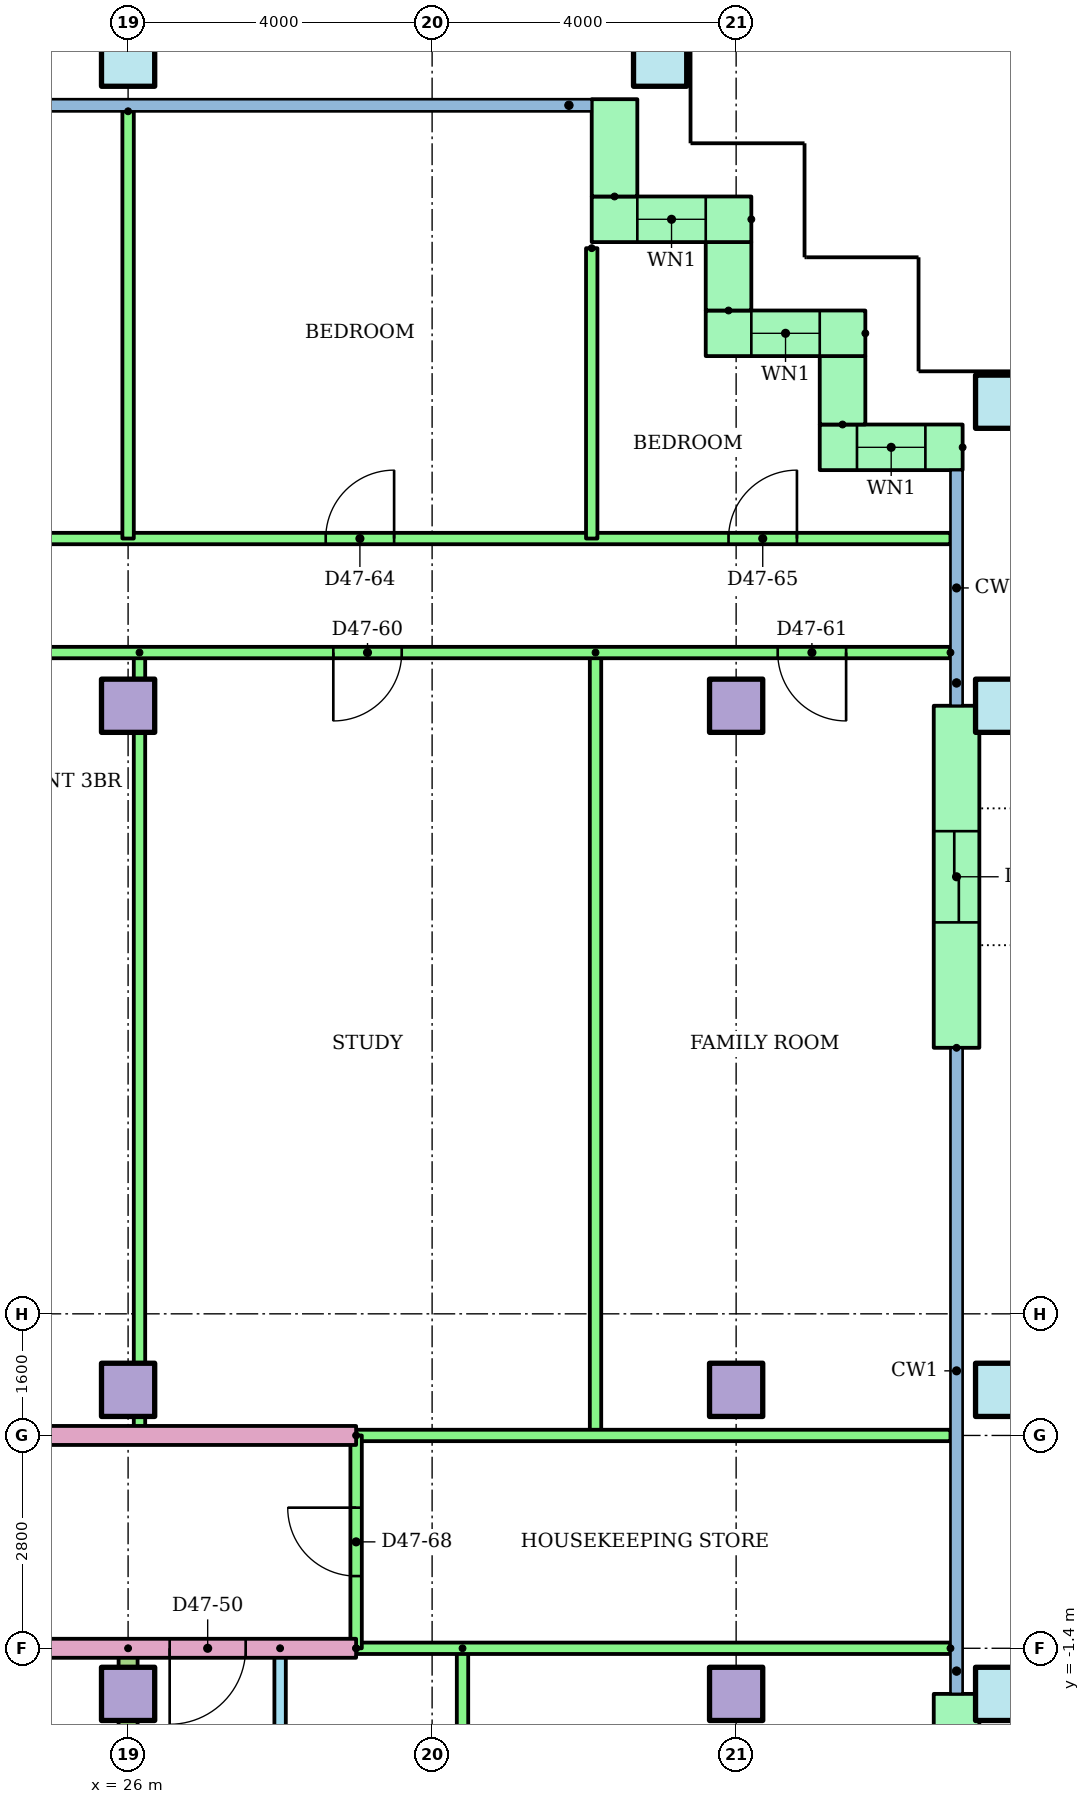
"""IFC4 building model, lengths in metres.
Left out: names, types, materials, properties, quantities, classifications, styles, units other than length and angle.
Written with IfcOpenShell. Run it as: python <this file> out.ifc"""

import sys

from ifc_helpers import new_model, si_unit, direction, frame, frame_2d, origin, origin_2d, place, context, subcontext, project, spatial, rectangle, hollow_rectangle, extrude, element, fill, save


model = new_model("IFC4")
c1 = context("Model", 3, precision=1e-05, world=origin(), true_north=direction((0.0, 1.0)))
c2 = subcontext(c1, "Body", "Model", "MODEL_VIEW")
j1 = project(units=[si_unit("LENGTHUNIT", "METRE"), si_unit("PLANEANGLEUNIT", "RADIAN")], contexts=[c1])
p1 = place(None, origin())
s1 = spatial("IfcSite", under=j1, at=p1, CompositionType="ELEMENT")
p2 = place(p1, origin())
s2 = spatial("IfcBuilding", under=s1, at=p2, CompositionType="ELEMENT")
p3 = place(p2, frame((0.0, 0.0, 181.3)))
s3 = spatial("IfcBuildingStorey", under=s2, at=p3, CompositionType="ELEMENT", Elevation=181.3)
for number, where in (
    (1, (26.0, -2.0, 0.0)),
    (2, (34.0, -2.0, 0.0)),
):
    element("IfcColumn", number, at=place(p3, frame(where)), inside=s3, PredefinedType="COLUMN", context=c2, shape_type="SweptSolid", body=[
        extrude(rectangle(XDim=0.7, YDim=0.7, at=origin_2d()), origin(), (0.0, 0.0, 1.0), 3.2),
    ])
p4 = place(p3, frame((37.5, -2.0, 0.0)))
e3 = element("IfcColumn", 3, at=p4, inside=s3, PredefinedType="COLUMN", context=c2, shape_type="SweptSolid", body=[
    extrude(hollow_rectangle(XDim=0.7, YDim=0.7, WallThickness=0.036, at=origin_2d()), origin(), (0.0, 0.0, 1.0), 3.2),
])
for number, where in (
    (4, (26.0, 2.0, 0.0)),
    (5, (34.0, 2.0, 0.0)),
):
    element("IfcColumn", number, at=place(p3, frame(where)), inside=s3, PredefinedType="COLUMN", context=c2, shape_type="SweptSolid", body=[
        extrude(rectangle(XDim=0.7, YDim=0.7, at=origin_2d()), origin(), (0.0, 0.0, 1.0), 3.2),
    ])
p5 = place(p3, frame((37.5, 2.0, 0.0)))
e6 = element("IfcColumn", 6, at=p5, inside=s3, PredefinedType="COLUMN", context=c2, shape_type="SweptSolid", body=[
    extrude(hollow_rectangle(XDim=0.7, YDim=0.7, WallThickness=0.036, at=origin_2d()), origin(), (0.0, 0.0, 1.0), 3.2),
])
for number, where in (
    (7, (26.0, 11.0, 0.0)),
    (8, (34.0, 11.0, 0.0)),
):
    element("IfcColumn", number, at=place(p3, frame(where)), inside=s3, PredefinedType="COLUMN", context=c2, shape_type="SweptSolid", body=[
        extrude(rectangle(XDim=0.7, YDim=0.7, at=origin_2d()), origin(), (0.0, 0.0, 1.0), 3.2),
    ])
for number, where in (
    (9, (37.5, 11.0, 0.0)),
    (10, (37.5, 15.0, 0.0)),
    (11, (26.0, 19.5, 0.0)),
    (12, (33.0, 19.5, 0.0)),
):
    element("IfcColumn", number, at=place(p3, frame(where)), inside=s3, PredefinedType="COLUMN", context=c2, shape_type="SweptSolid", body=[
        extrude(hollow_rectangle(XDim=0.7, YDim=0.7, WallThickness=0.036, at=origin_2d()), origin(), (0.0, 0.0, 1.0), 3.2),
    ])
p6 = place(p3, frame((36.98, 14.4, 0.0), z_axis=(0.0, 0.0, 1.0), x_axis=(-1.0, 0.0, 0.0)))
e13 = element("IfcWall", 13, at=p6, inside=s3, PredefinedType="STANDARD", context=c2, shape_type="SweptSolid", body=[
    extrude(rectangle(XDim=1.88, YDim=0.6, at=frame_2d((0.94, 0.0))), origin(), (0.0, 0.0, 1.0), 2.92),
])
p7 = place(p6, frame((0.49, 0.0, 0.9)))
e14 = element("IfcOpeningElement", 14, at=p7, cuts=e13, PredefinedType="OPENING", context=c2, shape_type="SweptSolid", body=[
    extrude(rectangle(XDim=0.9, YDim=1.5, at=frame_2d((0.45, 0.75))), frame((0.0, 0.31, 0.0), z_axis=(0.0, -1.0, 0.0), x_axis=(1.0, 0.0, 0.0)), (0.0, 0.0, 1.0), 0.62),
])
p8 = place(p3, frame((35.4, 14.7, 0.0), z_axis=(0.0, 0.0, 1.0), x_axis=(0.0, 1.0, 0.0)))
e15 = element("IfcWall", 15, at=p8, inside=s3, PredefinedType="STANDARD", context=c2, shape_type="SweptSolid", body=[
    extrude(rectangle(XDim=0.9, YDim=0.6, at=frame_2d((0.45, 0.0))), origin(), (0.0, 0.0, 1.0), 2.92),
])
p9 = place(p3, frame((35.7, 15.9, 0.0), z_axis=(0.0, 0.0, 1.0), x_axis=(-1.0, 0.0, 0.0)))
e16 = element("IfcWall", 16, at=p9, inside=s3, PredefinedType="STANDARD", context=c2, shape_type="SweptSolid", body=[
    extrude(rectangle(XDim=2.1, YDim=0.6, at=frame_2d((1.05, 0.0))), origin(), (0.0, 0.0, 1.0), 2.92),
])
p10 = place(p9, frame((0.6, 0.0, 0.9)))
e17 = element("IfcOpeningElement", 17, at=p10, cuts=e16, PredefinedType="OPENING", context=c2, shape_type="SweptSolid", body=[
    extrude(rectangle(XDim=0.9, YDim=1.5, at=frame_2d((0.45, 0.75))), frame((0.0, 0.31, 0.0), z_axis=(0.0, -1.0, 0.0), x_axis=(1.0, 0.0, 0.0)), (0.0, 0.0, 1.0), 0.62),
])
p11 = place(p3, frame((33.9, 16.2, 0.0), z_axis=(0.0, 0.0, 1.0), x_axis=(0.0, 1.0, 0.0)))
e18 = element("IfcWall", 18, at=p11, inside=s3, PredefinedType="STANDARD", context=c2, shape_type="SweptSolid", body=[
    extrude(rectangle(XDim=0.9, YDim=0.6, at=frame_2d((0.45, 0.0))), origin(), (0.0, 0.0, 1.0), 2.92),
])
p12 = place(p3, frame((34.2, 17.4, 0.0), z_axis=(0.0, 0.0, 1.0), x_axis=(-1.0, 0.0, 0.0)))
e19 = element("IfcWall", 19, at=p12, inside=s3, PredefinedType="STANDARD", context=c2, shape_type="SweptSolid", body=[
    extrude(rectangle(XDim=2.1, YDim=0.6, at=frame_2d((1.05, 0.0))), origin(), (0.0, 0.0, 1.0), 2.92),
])
p13 = place(p12, frame((0.6, 0.0, 0.9)))
e20 = element("IfcOpeningElement", 20, at=p13, cuts=e19, PredefinedType="OPENING", context=c2, shape_type="SweptSolid", body=[
    extrude(rectangle(XDim=0.9, YDim=1.5, at=frame_2d((0.45, 0.75))), frame((0.0, 0.31, 0.0), z_axis=(0.0, -1.0, 0.0), x_axis=(1.0, 0.0, 0.0)), (0.0, 0.0, 1.0), 0.62),
])
p14 = place(p3, frame((32.4, 17.7, 0.0), z_axis=(0.0, 0.0, 1.0), x_axis=(0.0, 1.0, 0.0)))
e21 = element("IfcWall", 21, at=p14, inside=s3, PredefinedType="STANDARD", context=c2, shape_type="SweptSolid", body=[
    extrude(rectangle(XDim=1.28, YDim=0.6, at=frame_2d((0.64, 0.0))), origin(), (0.0, 0.0, 1.0), 2.92),
])
p15 = place(p3, frame((36.9, -5.7, 0.0), z_axis=(0.0, 0.0, 1.0), x_axis=(0.0, 1.0, 0.0)))
e22 = element("IfcWall", 22, at=p15, inside=s3, PredefinedType="STANDARD", context=c2, shape_type="SweptSolid", body=[
    extrude(rectangle(XDim=3.7, YDim=0.6, at=frame_2d((1.85, 0.0))), origin(), (0.0, 0.0, 1.0), 2.92),
])
p16 = place(p15, frame((1.25, 0.0, 0.0)))
e23 = element("IfcOpeningElement", 23, at=p16, cuts=e22, PredefinedType="OPENING", context=c2, shape_type="SweptSolid", body=[
    extrude(rectangle(XDim=1.2, YDim=2.1, at=frame_2d((0.6, 1.05))), frame((0.0, 0.31, 0.0), z_axis=(0.0, -1.0, 0.0), x_axis=(1.0, 0.0, 0.0)), (0.0, 0.0, 1.0), 0.62),
])
p17 = place(p3, frame((36.9, 6.5, 0.0), z_axis=(0.0, 0.0, 1.0), x_axis=(0.0, 1.0, 0.0)))
e24 = element("IfcWall", 24, at=p17, inside=s3, PredefinedType="STANDARD", context=c2, shape_type="SweptSolid", body=[
    extrude(rectangle(XDim=4.5, YDim=0.6, at=frame_2d((2.25, 0.0))), origin(), (0.0, 0.0, 1.0), 2.92),
])
p18 = place(p17, frame((1.65, 0.0, 0.0)))
e25 = element("IfcOpeningElement", 25, at=p18, cuts=e24, PredefinedType="OPENING", context=c2, shape_type="SweptSolid", body=[
    extrude(rectangle(XDim=1.2, YDim=2.1, at=frame_2d((0.6, 1.05))), frame((0.0, 0.31, 0.0), z_axis=(0.0, -1.0, 0.0), x_axis=(1.0, 0.0, 0.0)), (0.0, 0.0, 1.0), 0.62),
])
p19 = place(p3, frame((28.0, -1.4, 0.0), z_axis=(0.0, 0.0, 1.0), x_axis=(0.0, -1.0, 0.0)))
e26 = element("IfcWall", 26, at=p19, inside=s3, PredefinedType="PARTITIONING", context=c2, shape_type="SweptSolid", body=[
    extrude(rectangle(XDim=7.9, YDim=0.15, at=frame_2d((3.95, 0.0))), origin(), (0.0, 0.0, 1.0), 2.4),
])
p20 = place(p19, frame((1.675, 0.0, 0.0)))
e27 = element("IfcOpeningElement", 27, at=p20, cuts=e26, PredefinedType="OPENING", context=c2, shape_type="SweptSolid", body=[
    extrude(rectangle(XDim=0.9, YDim=2.1, at=frame_2d((0.45, 1.05))), frame((0.0, 0.085, 0.0), z_axis=(0.0, -1.0, 0.0), x_axis=(1.0, 0.0, 0.0)), (0.0, 0.0, 1.0), 0.17),
])
p21 = place(p19, frame((5.675, 0.0, 0.0)))
e28 = element("IfcOpeningElement", 28, at=p21, cuts=e26, PredefinedType="OPENING", context=c2, shape_type="SweptSolid", body=[
    extrude(rectangle(XDim=0.8, YDim=2.1, at=frame_2d((0.4, 1.05))), frame((0.0, 0.085, 0.0), z_axis=(0.0, -1.0, 0.0), x_axis=(1.0, 0.0, 0.0)), (0.0, 0.0, 1.0), 0.17),
])
p22 = place(p3, frame((30.4, -1.4, 0.0), z_axis=(0.0, 0.0, 1.0), x_axis=(0.0, -1.0, 0.0)))
e29 = element("IfcWall", 29, at=p22, inside=s3, PredefinedType="PARTITIONING", context=c2, shape_type="SweptSolid", body=[
    extrude(rectangle(XDim=7.9, YDim=0.15, at=frame_2d((3.95, 0.0))), origin(), (0.0, 0.0, 1.0), 2.4),
])
p23 = place(p3, frame((26.0, -1.4, 0.0), z_axis=(0.0, 0.0, 1.0), x_axis=(0.0, -1.0, 0.0)))
e30 = element("IfcWall", 30, at=p23, inside=s3, PredefinedType="PARTITIONING", context=c2, shape_type="SweptSolid", body=[
    extrude(rectangle(XDim=15.01, YDim=0.25, at=frame_2d((7.505, 0.0))), origin(), (0.0, 0.0, 1.0), 2.4),
])
p24 = place(p3, frame((29.0, -1.4, 0.0), z_axis=(0.0, 0.0, 1.0), x_axis=(-1.0, 0.0, 0.0)))
e31 = element("IfcWall", 31, at=p24, inside=s3, PredefinedType="PARTITIONING", context=c2, shape_type="SweptSolid", body=[
    extrude(rectangle(XDim=15.0, YDim=0.25, at=frame_2d((7.5, 0.0))), origin(), (0.0, 0.0, 1.0), 2.4),
])
p25 = place(p24, frame((9.453, 0.0, 0.0)))
e32 = element("IfcOpeningElement", 32, at=p25, cuts=e31, PredefinedType="OPENING", context=c2, shape_type="SweptSolid", body=[
    extrude(rectangle(XDim=1.0, YDim=2.1, at=frame_2d((0.5, 1.05))), frame((0.0, 0.135, 0.0), z_axis=(0.0, -1.0, 0.0), x_axis=(1.0, 0.0, 0.0)), (0.0, 0.0, 1.0), 0.27),
])
p26 = place(p24, frame((1.453, 0.0, 0.0)))
e33 = element("IfcOpeningElement", 33, at=p26, cuts=e31, PredefinedType="OPENING", context=c2, shape_type="SweptSolid", body=[
    extrude(rectangle(XDim=1.0, YDim=2.1, at=frame_2d((0.5, 1.05))), frame((0.0, 0.135, 0.0), z_axis=(0.0, -1.0, 0.0), x_axis=(1.0, 0.0, 0.0)), (0.0, 0.0, 1.0), 0.27),
])
p27 = place(p3, frame((36.82, -1.4, 0.0), z_axis=(0.0, 0.0, 1.0), x_axis=(-1.0, 0.0, 0.0)))
e34 = element("IfcWall", 34, at=p27, inside=s3, PredefinedType="PARTITIONING", context=c2, shape_type="SweptSolid", body=[
    extrude(rectangle(XDim=7.82, YDim=0.15, at=frame_2d((3.91, 0.0))), origin(), (0.0, 0.0, 1.0), 2.4),
])
for number, where, z_axis, x_axis in (
    (35, (26.15, 11.7, 0.0), (0.0, 0.0, 1.0), (0.0, -1.0, 0.0)),
    (36, (32.15, 11.7, 0.0), (0.0, 0.0, 1.0), (0.0, -1.0, 0.0)),
):
    element("IfcWall", number, at=place(p3, frame(where, z_axis=z_axis, x_axis=x_axis)), inside=s3, PredefinedType="PARTITIONING", context=c2, shape_type="SweptSolid", body=[
        extrude(rectangle(XDim=10.3, YDim=0.15, at=frame_2d((5.15, 0.0))), origin(), (0.0, 0.0, 1.0), 2.4),
    ])
p28 = place(p3, frame((36.82, 11.7, 0.0), z_axis=(0.0, 0.0, 1.0), x_axis=(-1.0, 0.0, 0.0)))
e37 = element("IfcWall", 37, at=p28, inside=s3, PredefinedType="PARTITIONING", context=c2, shape_type="SweptSolid", body=[
    extrude(rectangle(XDim=20.82, YDim=0.15, at=frame_2d((10.41, 0.0))), origin(), (0.0, 0.0, 1.0), 2.4),
])
p29 = place(p28, frame((14.095, 0.0, 0.0)))
e38 = element("IfcOpeningElement", 38, at=p29, cuts=e37, PredefinedType="OPENING", context=c2, shape_type="SweptSolid", body=[
    extrude(rectangle(XDim=0.9, YDim=2.1, at=frame_2d((0.45, 1.05))), frame((0.0, 0.085, 0.0), z_axis=(0.0, -1.0, 0.0), x_axis=(1.0, 0.0, 0.0)), (0.0, 0.0, 1.0), 0.17),
])
p30 = place(p28, frame((7.22, 0.0, 0.0)))
e39 = element("IfcOpeningElement", 39, at=p30, cuts=e37, PredefinedType="OPENING", context=c2, shape_type="SweptSolid", body=[
    extrude(rectangle(XDim=0.9, YDim=2.1, at=frame_2d((0.45, 1.05))), frame((0.0, 0.085, 0.0), z_axis=(0.0, -1.0, 0.0), x_axis=(1.0, 0.0, 0.0)), (0.0, 0.0, 1.0), 0.17),
])
p31 = place(p28, frame((1.373, 0.0, 0.0)))
e40 = element("IfcOpeningElement", 40, at=p31, cuts=e37, PredefinedType="OPENING", context=c2, shape_type="SweptSolid", body=[
    extrude(rectangle(XDim=0.9, YDim=2.1, at=frame_2d((0.45, 1.05))), frame((0.0, 0.085, 0.0), z_axis=(0.0, -1.0, 0.0), x_axis=(1.0, 0.0, 0.0)), (0.0, 0.0, 1.0), 0.17),
])
p32 = place(p3, frame((14.0, 13.2, 0.0)))
e41 = element("IfcWall", 41, at=p32, inside=s3, PredefinedType="PARTITIONING", context=c2, shape_type="SweptSolid", body=[
    extrude(rectangle(XDim=22.82, YDim=0.15, at=frame_2d((11.41, 0.0))), origin(), (0.0, 0.0, 1.0), 2.4),
])
p33 = place(p32, frame((1.5, 0.0, 0.0)))
e42 = element("IfcOpeningElement", 42, at=p33, cuts=e41, PredefinedType="OPENING", context=c2, shape_type="SweptSolid", body=[
    extrude(rectangle(XDim=1.0, YDim=2.1, at=frame_2d((0.5, 1.05))), frame((0.0, 0.085, 0.0), z_axis=(0.0, -1.0, 0.0), x_axis=(1.0, 0.0, 0.0)), (0.0, 0.0, 1.0), 0.17),
])
p34 = place(p32, frame((7.55, 0.0, 0.0)))
e43 = element("IfcOpeningElement", 43, at=p34, cuts=e41, PredefinedType="OPENING", context=c2, shape_type="SweptSolid", body=[
    extrude(rectangle(XDim=0.9, YDim=2.1, at=frame_2d((0.45, 1.05))), frame((0.0, 0.085, 0.0), z_axis=(0.0, -1.0, 0.0), x_axis=(1.0, 0.0, 0.0)), (0.0, 0.0, 1.0), 0.17),
])
p35 = place(p32, frame((14.6, 0.0, 0.0)))
e44 = element("IfcOpeningElement", 44, at=p35, cuts=e41, PredefinedType="OPENING", context=c2, shape_type="SweptSolid", body=[
    extrude(rectangle(XDim=0.9, YDim=2.1, at=frame_2d((0.45, 1.05))), frame((0.0, 0.085, 0.0), z_axis=(0.0, -1.0, 0.0), x_axis=(1.0, 0.0, 0.0)), (0.0, 0.0, 1.0), 0.17),
])
p36 = place(p32, frame((19.9, 0.0, 0.0)))
e45 = element("IfcOpeningElement", 45, at=p36, cuts=e41, PredefinedType="OPENING", context=c2, shape_type="SweptSolid", body=[
    extrude(rectangle(XDim=0.9, YDim=2.1, at=frame_2d((0.45, 1.05))), frame((0.0, 0.085, 0.0), z_axis=(0.0, -1.0, 0.0), x_axis=(1.0, 0.0, 0.0)), (0.0, 0.0, 1.0), 0.17),
])
p37 = place(p3, frame((26.0, 18.821, 0.0), z_axis=(0.0, 0.0, 1.0), x_axis=(0.0, -1.0, 0.0)))
e46 = element("IfcWall", 46, at=p37, inside=s3, PredefinedType="PARTITIONING", context=c2, shape_type="SweptSolid", body=[
    extrude(rectangle(XDim=5.621, YDim=0.15, at=frame_2d((2.811, 0.0))), origin(), (0.0, 0.0, 1.0), 2.4),
])
p38 = place(p3, frame((32.1, 17.02, 0.0), z_axis=(0.0, 0.0, 1.0), x_axis=(0.0, -1.0, 0.0)))
e47 = element("IfcWall", 47, at=p38, inside=s3, PredefinedType="PARTITIONING", context=c2, shape_type="SweptSolid", body=[
    extrude(rectangle(XDim=3.82, YDim=0.15, at=frame_2d((1.91, 0.0))), origin(), (0.0, 0.0, 1.0), 2.4),
])
p39 = place(p3, frame((14.0, 1.4, 0.0)))
e48 = element("IfcWall", 48, at=p39, inside=s3, PredefinedType="PARTITIONING", context=c2, shape_type="SweptSolid", body=[
    extrude(rectangle(XDim=15.0, YDim=0.25, at=frame_2d((7.5, 0.0))), origin(), (0.0, 0.0, 1.0), 2.4),
])
p40 = place(p39, frame((0.5, 0.0, 0.0)))
e49 = element("IfcOpeningElement", 49, at=p40, cuts=e48, PredefinedType="OPENING", context=c2, shape_type="SweptSolid", body=[
    extrude(rectangle(XDim=1.0, YDim=2.1, at=frame_2d((0.5, 1.05))), frame((0.0, 0.135, 0.0), z_axis=(0.0, -1.0, 0.0), x_axis=(1.0, 0.0, 0.0)), (0.0, 0.0, 1.0), 0.27),
])
p41 = place(p3, frame((29.0, 1.4, 0.0)))
e50 = element("IfcWall", 50, at=p41, inside=s3, PredefinedType="PARTITIONING", context=c2, shape_type="SweptSolid", body=[
    extrude(rectangle(XDim=7.82, YDim=0.15, at=frame_2d((3.91, 0.0))), origin(), (0.0, 0.0, 1.0), 2.4),
])
p42 = place(p3, frame((29.0, -1.4, 0.0), z_axis=(0.0, 0.0, 1.0), x_axis=(0.0, 1.0, 0.0)))
e51 = element("IfcWall", 51, at=p42, inside=s3, PredefinedType="PARTITIONING", context=c2, shape_type="SweptSolid", body=[
    extrude(rectangle(XDim=2.8, YDim=0.15, at=frame_2d((1.4, 0.0))), origin(), (0.0, 0.0, 1.0), 2.4),
])
p43 = place(p42, frame((0.95, 0.0, 0.0)))
e52 = element("IfcOpeningElement", 52, at=p43, cuts=e51, PredefinedType="OPENING", context=c2, shape_type="SweptSolid", body=[
    extrude(rectangle(XDim=0.9, YDim=2.1, at=frame_2d((0.45, 1.05))), frame((0.0, 0.085, 0.0), z_axis=(0.0, -1.0, 0.0), x_axis=(1.0, 0.0, 0.0)), (0.0, 0.0, 1.0), 0.17),
])
p44 = place(p7, origin())
e53 = element("IfcWindow", 53, at=p44, inside=s3, PartitioningType="SINGLE_PANEL", PredefinedType="WINDOW", context=c2, shape_type="SweptSolid", body=[
    extrude(rectangle(XDim=0.9, YDim=1.5, at=frame_2d((0.45, 0.75))), frame((0.0, 0.03, 0.0), z_axis=(0.0, -1.0, 0.0), x_axis=(1.0, 0.0, 0.0)), (0.0, 0.0, 1.0), 0.06),
])
fill(e14, e53)
p45 = place(p10, origin())
e54 = element("IfcWindow", 54, at=p45, inside=s3, PartitioningType="SINGLE_PANEL", PredefinedType="WINDOW", context=c2, shape_type="SweptSolid", body=[
    extrude(rectangle(XDim=0.9, YDim=1.5, at=frame_2d((0.45, 0.75))), frame((0.0, 0.03, 0.0), z_axis=(0.0, -1.0, 0.0), x_axis=(1.0, 0.0, 0.0)), (0.0, 0.0, 1.0), 0.06),
])
fill(e17, e54)
p46 = place(p13, origin())
e55 = element("IfcWindow", 55, at=p46, inside=s3, PartitioningType="SINGLE_PANEL", PredefinedType="WINDOW", context=c2, shape_type="SweptSolid", body=[
    extrude(rectangle(XDim=0.9, YDim=1.5, at=frame_2d((0.45, 0.75))), frame((0.0, 0.03, 0.0), z_axis=(0.0, -1.0, 0.0), x_axis=(1.0, 0.0, 0.0)), (0.0, 0.0, 1.0), 0.06),
])
fill(e20, e55)
p47 = place(p26, origin())
e56 = element("IfcDoor", 56, at=p47, inside=s3, OperationType="SINGLE_SWING_RIGHT", PredefinedType="DOOR", context=c2, shape_type="SweptSolid", body=[
    extrude(rectangle(XDim=1.0, YDim=2.1, at=frame_2d((0.5, 1.05))), frame((0.0, 0.025, 0.0), z_axis=(0.0, -1.0, 0.0), x_axis=(1.0, 0.0, 0.0)), (0.0, 0.0, 1.0), 0.05),
])
fill(e33, e56)
p48 = place(p30, origin())
e57 = element("IfcDoor", 57, at=p48, inside=s3, OperationType="SINGLE_SWING_RIGHT", PredefinedType="DOOR", context=c2, shape_type="SweptSolid", body=[
    extrude(rectangle(XDim=0.9, YDim=2.1, at=frame_2d((0.45, 1.05))), frame((0.0, 0.025, 0.0), z_axis=(0.0, -1.0, 0.0), x_axis=(1.0, 0.0, 0.0)), (0.0, 0.0, 1.0), 0.05),
])
fill(e39, e57)
p49 = place(p31, origin())
e58 = element("IfcDoor", 58, at=p49, inside=s3, OperationType="SINGLE_SWING_LEFT", PredefinedType="DOOR", context=c2, shape_type="SweptSolid", body=[
    extrude(rectangle(XDim=0.9, YDim=2.1, at=frame_2d((0.45, 1.05))), frame((0.0, 0.025, 0.0), z_axis=(0.0, -1.0, 0.0), x_axis=(1.0, 0.0, 0.0)), (0.0, 0.0, 1.0), 0.05),
])
fill(e40, e58)
p50 = place(p35, origin())
e59 = element("IfcDoor", 59, at=p50, inside=s3, OperationType="SINGLE_SWING_RIGHT", PredefinedType="DOOR", context=c2, shape_type="SweptSolid", body=[
    extrude(rectangle(XDim=0.9, YDim=2.1, at=frame_2d((0.45, 1.05))), frame((0.0, 0.025, 0.0), z_axis=(0.0, -1.0, 0.0), x_axis=(1.0, 0.0, 0.0)), (0.0, 0.0, 1.0), 0.05),
])
fill(e44, e59)
p51 = place(p36, origin())
e60 = element("IfcDoor", 60, at=p51, inside=s3, OperationType="SINGLE_SWING_RIGHT", PredefinedType="DOOR", context=c2, shape_type="SweptSolid", body=[
    extrude(rectangle(XDim=0.9, YDim=2.1, at=frame_2d((0.45, 1.05))), frame((0.0, 0.025, 0.0), z_axis=(0.0, -1.0, 0.0), x_axis=(1.0, 0.0, 0.0)), (0.0, 0.0, 1.0), 0.05),
])
fill(e45, e60)
p52 = place(p43, origin())
e61 = element("IfcDoor", 61, at=p52, inside=s3, OperationType="SINGLE_SWING_RIGHT", PredefinedType="DOOR", context=c2, shape_type="SweptSolid", body=[
    extrude(rectangle(XDim=0.9, YDim=2.1, at=frame_2d((0.45, 1.05))), frame((0.0, 0.025, 0.0), z_axis=(0.0, -1.0, 0.0), x_axis=(1.0, 0.0, 0.0)), (0.0, 0.0, 1.0), 0.05),
])
fill(e52, e61)
p53 = place(p18, origin())
e62 = element("IfcDoor", 62, at=p53, inside=s3, OperationType="SLIDING_TO_LEFT", PredefinedType="DOOR", context=c2, shape_type="SweptSolid", body=[
    extrude(rectangle(XDim=1.2, YDim=2.1, at=frame_2d((0.6, 1.05))), frame((0.0, 0.025, 0.0), z_axis=(0.0, -1.0, 0.0), x_axis=(1.0, 0.0, 0.0)), (0.0, 0.0, 1.0), 0.05),
])
fill(e25, e62)
save(model, sys.argv[1])
